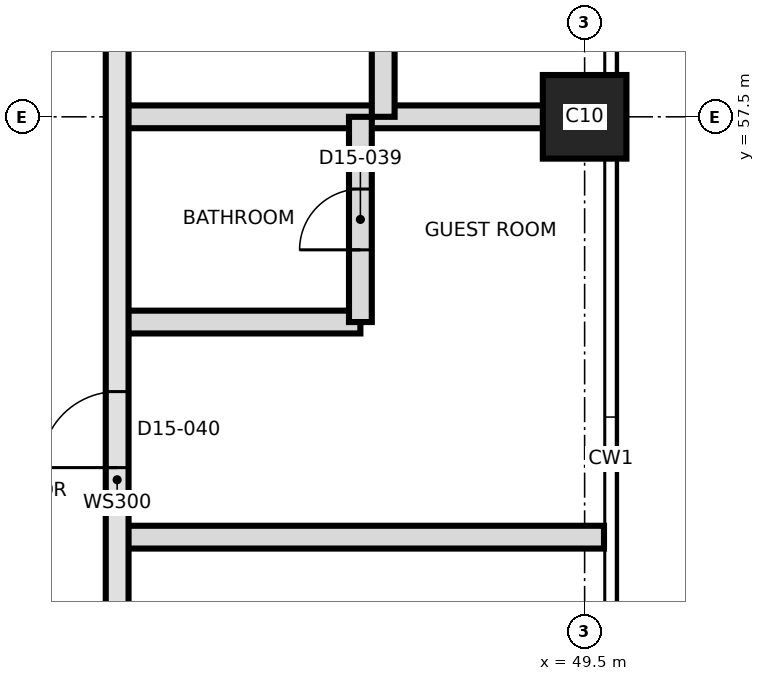
"""IFC4 building model, lengths in metres.
Left out: names, types, materials, properties, quantities, classifications, styles, units other than length and angle.
Written with IfcOpenShell. Run it as: python <this file> out.ifc"""

import sys

from ifc_helpers import new_model, si_unit, direction, frame, frame_2d, origin, origin_2d, place, context, subcontext, project, spatial, rectangle, extrude, element, fill, save


model = new_model("IFC4")
c1 = context("Model", 3, precision=1e-05, world=origin(), true_north=direction((0.0, 1.0)))
c2 = subcontext(c1, "Body", "Model", "MODEL_VIEW")
j1 = project(units=[si_unit("LENGTHUNIT", "METRE"), si_unit("PLANEANGLEUNIT", "RADIAN")], contexts=[c1])
p1 = place(None, origin())
s1 = spatial("IfcSite", under=j1, at=p1, CompositionType="ELEMENT")
p2 = place(p1, origin())
s2 = spatial("IfcBuilding", under=s1, at=p2, CompositionType="ELEMENT")
p3 = place(p2, frame((0.0, 0.0, 157.0)))
s3 = spatial("IfcBuildingStorey", under=s2, at=p3, CompositionType="ELEMENT", Elevation=157.0)
p4 = place(p3, frame((49.5, 57.5, 0.0), z_axis=(0.0, 0.0, 1.0), x_axis=(1.0, 0.0, 0.0)))
e1 = element("IfcColumn", 1, at=p4, inside=s3, PredefinedType="COLUMN", context=c2, shape_type="SweptSolid", body=[
    extrude(rectangle(XDim=1.1, YDim=1.1, at=origin_2d()), origin(), (0.0, 0.0, 1.0), 3.7),
])
p5 = place(p3, frame((43.35, 51.97, 0.0), z_axis=(0.0, 0.0, 1.0), x_axis=(1.0, 0.0, 0.0)))
e2 = element("IfcWall", 2, at=p5, inside=s3, PredefinedType="PARTITIONING", context=c2, shape_type="SweptSolid", body=[
    extrude(rectangle(XDim=6.405, YDim=0.3, at=frame_2d((3.202, 0.0))), origin(), (0.0, 0.0, 1.0), 3.4),
])
p6 = place(p3, frame((43.35, 54.8, 0.0), z_axis=(0.0, 0.0, 1.0), x_axis=(1.0, 0.0, 0.0)))
e3 = element("IfcWall", 3, at=p6, inside=s3, PredefinedType="PARTITIONING", context=c2, shape_type="SweptSolid", body=[
    extrude(rectangle(XDim=3.2, YDim=0.3, at=frame_2d((1.6, 0.0))), origin(), (0.0, 0.0, 1.0), 3.4),
])
p7 = place(p3, frame((43.35, 57.5, 0.0), z_axis=(0.0, 0.0, 1.0), x_axis=(1.0, 0.0, 0.0)))
e4 = element("IfcWall", 4, at=p7, inside=s3, PredefinedType="PARTITIONING", context=c2, shape_type="SweptSolid", body=[
    extrude(rectangle(XDim=6.225, YDim=0.3, at=frame_2d((3.112, 0.0))), origin(), (0.0, 0.0, 1.0), 3.4),
])
p8 = place(p3, frame((43.35, 39.65, 0.0), z_axis=(0.0, 0.0, 1.0), x_axis=(0.0, 1.0, 0.0)))
e5 = element("IfcWall", 5, at=p8, inside=s3, PredefinedType="SOLIDWALL", context=c2, shape_type="SweptSolid", body=[
    extrude(rectangle(XDim=26.15, YDim=0.3, at=frame_2d((13.075, 0.0))), origin(), (0.0, 0.0, 1.0), 3.4),
])
p9 = place(p8, frame((3.1, 0.0, 0.0)))
e6 = element("IfcOpeningElement", 6, at=p9, cuts=e5, PredefinedType="OPENING", context=c2, shape_type="SweptSolid", body=[
    extrude(rectangle(XDim=1.0, YDim=2.1, at=frame_2d((0.5, 1.05))), frame((0.0, 0.16, 0.0), z_axis=(0.0, -1.0, 0.0), x_axis=(1.0, 0.0, 0.0)), (0.0, 0.0, 1.0), 0.32),
])
p10 = place(p8, frame((4.75, 0.0, 0.0)))
e7 = element("IfcOpeningElement", 7, at=p10, cuts=e5, PredefinedType="OPENING", context=c2, shape_type="SweptSolid", body=[
    extrude(rectangle(XDim=1.0, YDim=2.1, at=frame_2d((0.5, 1.05))), frame((0.0, 0.16, 0.0), z_axis=(0.0, -1.0, 0.0), x_axis=(1.0, 0.0, 0.0)), (0.0, 0.0, 1.0), 0.32),
])
p11 = place(p8, frame((9.985, 0.0, 0.0)))
e8 = element("IfcOpeningElement", 8, at=p11, cuts=e5, PredefinedType="OPENING", context=c2, shape_type="SweptSolid", body=[
    extrude(rectangle(XDim=1.2, YDim=2.1, at=frame_2d((0.6, 1.05))), frame((0.0, 0.16, 0.0), z_axis=(0.0, -1.0, 0.0), x_axis=(1.0, 0.0, 0.0)), (0.0, 0.0, 1.0), 0.32),
])
p12 = place(p8, frame((13.235, 0.0, 0.0)))
e9 = element("IfcOpeningElement", 9, at=p12, cuts=e5, PredefinedType="OPENING", context=c2, shape_type="SweptSolid", body=[
    extrude(rectangle(XDim=1.0, YDim=2.1, at=frame_2d((0.5, 1.05))), frame((0.0, 0.16, 0.0), z_axis=(0.0, -1.0, 0.0), x_axis=(1.0, 0.0, 0.0)), (0.0, 0.0, 1.0), 0.32),
])
p13 = place(p8, frame((21.4, 0.0, 0.0)))
e10 = element("IfcOpeningElement", 10, at=p13, cuts=e5, PredefinedType="OPENING", context=c2, shape_type="SweptSolid", body=[
    extrude(rectangle(XDim=1.0, YDim=2.4, at=frame_2d((0.5, 1.2))), frame((0.0, 0.16, 0.0), z_axis=(0.0, -1.0, 0.0), x_axis=(1.0, 0.0, 0.0)), (0.0, 0.0, 1.0), 0.32),
])
p14 = place(p3, frame((46.55, 54.8, 0.0), z_axis=(0.0, 0.0, 1.0), x_axis=(0.0, 1.0, 0.0)))
e11 = element("IfcWall", 11, at=p14, inside=s3, PredefinedType="PARTITIONING", context=c2, shape_type="SweptSolid", body=[
    extrude(rectangle(XDim=2.7, YDim=0.3, at=frame_2d((1.35, 0.0))), origin(), (0.0, 0.0, 1.0), 3.4),
])
p15 = place(p14, frame((0.95, 0.0, 0.0)))
e12 = element("IfcOpeningElement", 12, at=p15, cuts=e11, PredefinedType="OPENING", context=c2, shape_type="SweptSolid", body=[
    extrude(rectangle(XDim=0.8, YDim=2.1, at=frame_2d((0.4, 1.05))), frame((0.0, 0.16, 0.0), z_axis=(0.0, -1.0, 0.0), x_axis=(1.0, 0.0, 0.0)), (0.0, 0.0, 1.0), 0.32),
])
p16 = place(p3, frame((46.85, 57.5, 0.0), z_axis=(0.0, 0.0, 1.0), x_axis=(0.0, 1.0, 0.0)))
e13 = element("IfcWall", 13, at=p16, inside=s3, PredefinedType="PARTITIONING", context=c2, shape_type="SweptSolid", body=[
    extrude(rectangle(XDim=3.3, YDim=0.3, at=frame_2d((1.65, 0.0))), origin(), (0.0, 0.0, 1.0), 3.4),
])
p17 = place(p16, frame((1.25, 0.0, 0.0)))
e14 = element("IfcOpeningElement", 14, at=p17, cuts=e13, PredefinedType="OPENING", context=c2, shape_type="SweptSolid", body=[
    extrude(rectangle(XDim=0.8, YDim=2.1, at=frame_2d((0.4, 1.05))), frame((0.0, 0.16, 0.0), z_axis=(0.0, -1.0, 0.0), x_axis=(1.0, 0.0, 0.0)), (0.0, 0.0, 1.0), 0.32),
])
p18 = place(p15, origin())
e15 = element("IfcDoor", 15, at=p18, inside=s3, OperationType="SINGLE_SWING_RIGHT", PredefinedType="DOOR", context=c2, shape_type="SweptSolid", body=[
    extrude(rectangle(XDim=0.8, YDim=2.1, at=frame_2d((0.4, 1.05))), frame((0.0, 0.025, 0.0), z_axis=(0.0, -1.0, 0.0), x_axis=(1.0, 0.0, 0.0)), (0.0, 0.0, 1.0), 0.05),
])
fill(e12, e15)
p19 = place(p12, origin())
e16 = element("IfcDoor", 16, at=p19, inside=s3, OperationType="SINGLE_SWING_LEFT", PredefinedType="DOOR", context=c2, shape_type="SweptSolid", body=[
    extrude(rectangle(XDim=1.0, YDim=2.1, at=frame_2d((0.5, 1.05))), frame((0.0, 0.025, 0.0), z_axis=(0.0, -1.0, 0.0), x_axis=(1.0, 0.0, 0.0)), (0.0, 0.0, 1.0), 0.05),
])
fill(e9, e16)
save(model, sys.argv[1])
